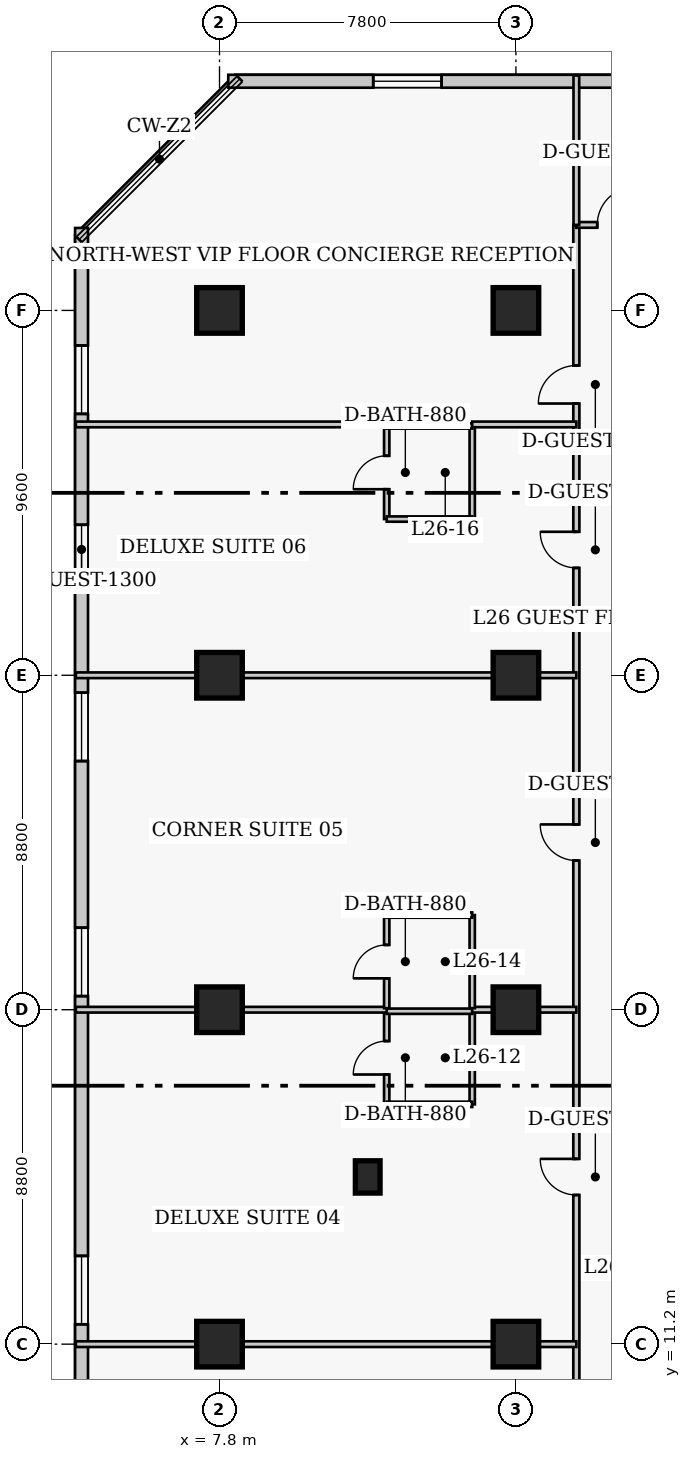
"""IFC4 building model, lengths in metres.
Left out: names, types, materials, properties, quantities, classifications, styles, units other than length and angle.
Written with IfcOpenShell. Run it as: python <this file> out.ifc"""

import sys

from ifc_helpers import new_model, si_unit, direction, frame, frame_2d, origin, origin_2d, place, context, subcontext, project, spatial, rectangle, extrude, element, fill, save


model = new_model("IFC4")
c1 = context("Model", 3, precision=1e-05, world=origin(), true_north=direction((0.0, 1.0)))
c2 = subcontext(c1, "Body", "Model", "MODEL_VIEW")
j1 = project(units=[si_unit("LENGTHUNIT", "METRE"), si_unit("PLANEANGLEUNIT", "RADIAN")], contexts=[c1])
p1 = place(None, origin())
s1 = spatial("IfcSite", under=j1, at=p1, CompositionType="ELEMENT")
p2 = place(p1, origin())
s2 = spatial("IfcBuilding", under=s1, at=p2, CompositionType="ELEMENT")
p3 = place(p2, frame((0.0, 0.0, 107.0)))
s3 = spatial("IfcBuildingStorey", under=s2, at=p3, CompositionType="ELEMENT", Elevation=107.0)
for number, where, z_axis, x_axis in (
    (1, (7.8, 11.2, 0.0), (0.0, 0.0, 1.0), (1.0, 0.0, 0.0)),
    (2, (7.8, 20.0, 0.0), (0.0, 0.0, 1.0), (1.0, 0.0, 0.0)),
    (3, (7.8, 28.8, 0.0), (0.0, 0.0, 1.0), (1.0, 0.0, 0.0)),
    (4, (7.8, 38.4, 0.0), (0.0, 0.0, 1.0), (1.0, 0.0, 0.0)),
    (5, (15.6, 11.2, 0.0), (0.0, 0.0, 1.0), (1.0, 0.0, 0.0)),
    (6, (15.6, 20.0, 0.0), (0.0, 0.0, 1.0), (1.0, 0.0, 0.0)),
    (7, (15.6, 28.8, 0.0), (0.0, 0.0, 1.0), (1.0, 0.0, 0.0)),
    (8, (15.6, 38.4, 0.0), (0.0, 0.0, 1.0), (1.0, 0.0, 0.0)),
):
    element("IfcColumn", number, at=place(p3, frame(where, z_axis=z_axis, x_axis=x_axis)), inside=s3, PredefinedType="COLUMN", context=c2, shape_type="SweptSolid", body=[
        extrude(rectangle(XDim=1.2, YDim=1.2, at=origin_2d()), origin(), (0.0, 0.0, 1.0), 3.8),
    ])
p4 = place(p3, frame((11.7, 15.6, 0.0), z_axis=(0.0, 0.0, 1.0), x_axis=(1.0, 0.0, 0.0)))
e9 = element("IfcColumn", 9, at=p4, inside=s3, PredefinedType="PILASTER", context=c2, shape_type="SweptSolid", body=[
    extrude(rectangle(XDim=0.65, YDim=0.85, at=origin_2d()), origin(), (0.0, 0.0, 1.0), 3.8),
])
p5 = place(p3, frame((36.32, 44.43, 0.0), z_axis=(0.0, 0.0, 1.0), x_axis=(-1.0, 0.0, 0.0)))
e10 = element("IfcWall", 10, at=p5, inside=s3, PredefinedType="SOLIDWALL", context=c2, shape_type="SweptSolid", body=[
    extrude(rectangle(XDim=28.29, YDim=0.34, at=frame_2d((14.145, 0.0))), origin(), (0.0, 0.0, 1.0), 3.54),
])
p6 = place(p5, frame((3.815, 0.0, 0.85)))
e11 = element("IfcOpeningElement", 11, at=p6, cuts=e10, PredefinedType="OPENING", context=c2, shape_type="SweptSolid", body=[
    extrude(rectangle(XDim=1.8, YDim=1.8, at=frame_2d((0.9, 0.9))), frame((0.0, 0.18, 0.0), z_axis=(0.0, -1.0, 0.0), x_axis=(1.0, 0.0, 0.0)), (0.0, 0.0, 1.0), 0.36),
])
p7 = place(p5, frame((13.245, 0.0, 0.85)))
e12 = element("IfcOpeningElement", 12, at=p7, cuts=e10, PredefinedType="OPENING", context=c2, shape_type="SweptSolid", body=[
    extrude(rectangle(XDim=1.8, YDim=1.8, at=frame_2d((0.9, 0.9))), frame((0.0, 0.18, 0.0), z_axis=(0.0, -1.0, 0.0), x_axis=(1.0, 0.0, 0.0)), (0.0, 0.0, 1.0), 0.36),
])
p8 = place(p5, frame((22.675, 0.0, 0.85)))
e13 = element("IfcOpeningElement", 13, at=p8, cuts=e10, PredefinedType="OPENING", context=c2, shape_type="SweptSolid", body=[
    extrude(rectangle(XDim=1.8, YDim=1.8, at=frame_2d((0.9, 0.9))), frame((0.0, 0.18, 0.0), z_axis=(0.0, -1.0, 0.0), x_axis=(1.0, 0.0, 0.0)), (0.0, 0.0, 1.0), 0.36),
])
p9 = place(p3, frame((4.17, 40.57, 0.0), z_axis=(0.0, 0.0, 1.0), x_axis=(0.0, -1.0, 0.0)))
e14 = element("IfcWall", 14, at=p9, inside=s3, PredefinedType="SOLIDWALL", context=c2, shape_type="SweptSolid", body=[
    extrude(rectangle(XDim=31.94, YDim=0.34, at=frame_2d((15.97, 0.0))), origin(), (0.0, 0.0, 1.0), 3.54),
])
p10 = place(p9, frame((3.093, 0.0, 0.85)))
e15 = element("IfcOpeningElement", 15, at=p10, cuts=e14, PredefinedType="OPENING", context=c2, shape_type="SweptSolid", body=[
    extrude(rectangle(XDim=1.8, YDim=1.8, at=frame_2d((0.9, 0.9))), frame((0.0, 0.18, 0.0), z_axis=(0.0, -1.0, 0.0), x_axis=(1.0, 0.0, 0.0)), (0.0, 0.0, 1.0), 0.36),
])
p11 = place(p9, frame((12.228, 0.0, 0.85)))
e16 = element("IfcOpeningElement", 16, at=p11, cuts=e14, PredefinedType="OPENING", context=c2, shape_type="SweptSolid", body=[
    extrude(rectangle(XDim=1.8, YDim=1.8, at=frame_2d((0.9, 0.9))), frame((0.0, 0.18, 0.0), z_axis=(0.0, -1.0, 0.0), x_axis=(1.0, 0.0, 0.0)), (0.0, 0.0, 1.0), 0.36),
])
p12 = place(p9, frame((18.413, 0.0, 0.85)))
e17 = element("IfcOpeningElement", 17, at=p12, cuts=e14, PredefinedType="OPENING", context=c2, shape_type="SweptSolid", body=[
    extrude(rectangle(XDim=1.8, YDim=1.8, at=frame_2d((0.9, 0.9))), frame((0.0, 0.18, 0.0), z_axis=(0.0, -1.0, 0.0), x_axis=(1.0, 0.0, 0.0)), (0.0, 0.0, 1.0), 0.36),
])
p13 = place(p9, frame((27.048, 0.0, 0.85)))
e18 = element("IfcOpeningElement", 18, at=p13, cuts=e14, PredefinedType="OPENING", context=c2, shape_type="SweptSolid", body=[
    extrude(rectangle(XDim=1.8, YDim=1.8, at=frame_2d((0.9, 0.9))), frame((0.0, 0.18, 0.0), z_axis=(0.0, -1.0, 0.0), x_axis=(1.0, 0.0, 0.0)), (0.0, 0.0, 1.0), 0.36),
])
p14 = place(p9, frame((7.81, 0.0, 0.85)))
e19 = element("IfcOpeningElement", 19, at=p14, cuts=e14, PredefinedType="OPENING", context=c2, shape_type="SweptSolid", body=[
    extrude(rectangle(XDim=1.3, YDim=1.7, at=frame_2d((0.65, 0.85))), frame((0.0, 0.18, 0.0), z_axis=(0.0, -1.0, 0.0), x_axis=(1.0, 0.0, 0.0)), (0.0, 0.0, 1.0), 0.36),
])
p15 = place(p3, frame((17.19, 6.65, 0.0), z_axis=(0.0, 0.0, 1.0), x_axis=(0.0, 1.0, 0.0)))
e20 = element("IfcWall", 20, at=p15, inside=s3, PredefinedType="PARTITIONING", context=c2, shape_type="SweptSolid", body=[
    extrude(rectangle(XDim=34.0, YDim=0.16, at=frame_2d((17.0, 0.0))), origin(), (0.0, 0.0, 1.0), 3.54),
])
p16 = place(p15, frame((1.8, 0.0, 0.0)))
e21 = element("IfcOpeningElement", 21, at=p16, cuts=e20, PredefinedType="OPENING", context=c2, shape_type="SweptSolid", body=[
    extrude(rectangle(XDim=0.95, YDim=2.1, at=frame_2d((0.475, 1.05))), frame((0.0, 0.09, 0.0), z_axis=(0.0, -1.0, 0.0), x_axis=(1.0, 0.0, 0.0)), (0.0, 0.0, 1.0), 0.18),
])
p17 = place(p15, frame((8.475, 0.0, 0.0)))
e22 = element("IfcOpeningElement", 22, at=p17, cuts=e20, PredefinedType="OPENING", context=c2, shape_type="SweptSolid", body=[
    extrude(rectangle(XDim=0.95, YDim=2.1, at=frame_2d((0.475, 1.05))), frame((0.0, 0.09, 0.0), z_axis=(0.0, -1.0, 0.0), x_axis=(1.0, 0.0, 0.0)), (0.0, 0.0, 1.0), 0.18),
])
p18 = place(p15, frame((17.275, 0.0, 0.0)))
e23 = element("IfcOpeningElement", 23, at=p18, cuts=e20, PredefinedType="OPENING", context=c2, shape_type="SweptSolid", body=[
    extrude(rectangle(XDim=0.95, YDim=2.1, at=frame_2d((0.475, 1.05))), frame((0.0, 0.09, 0.0), z_axis=(0.0, -1.0, 0.0), x_axis=(1.0, 0.0, 0.0)), (0.0, 0.0, 1.0), 0.18),
])
p19 = place(p15, frame((24.975, 0.0, 0.0)))
e24 = element("IfcOpeningElement", 24, at=p19, cuts=e20, PredefinedType="OPENING", context=c2, shape_type="SweptSolid", body=[
    extrude(rectangle(XDim=0.95, YDim=2.1, at=frame_2d((0.475, 1.05))), frame((0.0, 0.09, 0.0), z_axis=(0.0, -1.0, 0.0), x_axis=(1.0, 0.0, 0.0)), (0.0, 0.0, 1.0), 0.18),
])
p20 = place(p15, frame((29.3, 0.0, 0.0)))
e25 = element("IfcOpeningElement", 25, at=p20, cuts=e20, PredefinedType="OPENING", context=c2, shape_type="SweptSolid", body=[
    extrude(rectangle(XDim=1.0, YDim=2.15, at=frame_2d((0.5, 1.075))), frame((0.0, 0.09, 0.0), z_axis=(0.0, -1.0, 0.0), x_axis=(1.0, 0.0, 0.0)), (0.0, 0.0, 1.0), 0.18),
])
p21 = place(p3, frame((17.19, 40.65, 0.0), z_axis=(0.0, 0.0, 1.0), x_axis=(1.0, 0.0, 0.0)))
e26 = element("IfcWall", 26, at=p21, inside=s3, PredefinedType="PARTITIONING", context=c2, shape_type="SweptSolid", body=[
    extrude(rectangle(XDim=4.91, YDim=0.15, at=frame_2d((2.455, 0.0))), origin(), (0.0, 0.0, 1.0), 3.54),
])
p22 = place(p21, frame((0.55, 0.0, 0.0)))
e27 = element("IfcOpeningElement", 27, at=p22, cuts=e26, PredefinedType="OPENING", context=c2, shape_type="SweptSolid", body=[
    extrude(rectangle(XDim=1.0, YDim=2.15, at=frame_2d((0.5, 1.075))), frame((0.0, 0.085, 0.0), z_axis=(0.0, -1.0, 0.0), x_axis=(1.0, 0.0, 0.0)), (0.0, 0.0, 1.0), 0.17),
])
p23 = place(p3, frame((17.19, 40.65, 0.0), z_axis=(0.0, 0.0, 1.0), x_axis=(0.0, 1.0, 0.0)))
e28 = element("IfcWall", 28, at=p23, inside=s3, PredefinedType="PARTITIONING", context=c2, shape_type="SweptSolid", body=[
    extrude(rectangle(XDim=3.93, YDim=0.15, at=frame_2d((1.965, 0.0))), origin(), (0.0, 0.0, 1.0), 3.54),
])
p24 = place(p3, frame((4.02, 11.2, 0.0), z_axis=(0.0, 0.0, 1.0), x_axis=(1.0, 0.0, 0.0)))
e29 = element("IfcWall", 29, at=p24, inside=s3, PredefinedType="PARTITIONING", context=c2, shape_type="SweptSolid", body=[
    extrude(rectangle(XDim=13.17, YDim=0.15, at=frame_2d((6.585, 0.0))), origin(), (0.0, 0.0, 1.0), 2.679),
])
p25 = place(p3, frame((12.2, 17.51, 0.0), z_axis=(0.0, 0.0, 1.0), x_axis=(0.0, 1.0, 0.0)))
e30 = element("IfcWall", 30, at=p25, inside=s3, PredefinedType="PLUMBINGWALL", context=c2, shape_type="SweptSolid", body=[
    extrude(rectangle(XDim=2.45, YDim=0.14, at=frame_2d((1.225, 0.0))), origin(), (0.0, 0.0, 1.0), 3.54),
])
p26 = place(p25, frame((0.785, 0.0, 0.0)))
e31 = element("IfcOpeningElement", 31, at=p26, cuts=e30, PredefinedType="OPENING", context=c2, shape_type="SweptSolid", body=[
    extrude(rectangle(XDim=0.88, YDim=2.05, at=frame_2d((0.44, 1.025))), frame((0.0, 0.08, 0.0), z_axis=(0.0, -1.0, 0.0), x_axis=(1.0, 0.0, 0.0)), (0.0, 0.0, 1.0), 0.16),
])
p27 = place(p3, frame((14.45, 17.51, 0.0), z_axis=(0.0, 0.0, 1.0), x_axis=(0.0, 1.0, 0.0)))
e32 = element("IfcWall", 32, at=p27, inside=s3, PredefinedType="PLUMBINGWALL", context=c2, shape_type="SweptSolid", body=[
    extrude(rectangle(XDim=2.45, YDim=0.14, at=frame_2d((1.225, 0.0))), origin(), (0.0, 0.0, 1.0), 3.54),
])
p28 = place(p3, frame((12.2, 17.51, 0.0), z_axis=(0.0, 0.0, 1.0), x_axis=(1.0, 0.0, 0.0)))
e33 = element("IfcWall", 33, at=p28, inside=s3, PredefinedType="PLUMBINGWALL", context=c2, shape_type="SweptSolid", body=[
    extrude(rectangle(XDim=2.25, YDim=0.14, at=frame_2d((1.125, 0.0))), origin(), (0.0, 0.0, 1.0), 3.54),
])
p29 = place(p3, frame((12.2, 19.96, 0.0), z_axis=(0.0, 0.0, 1.0), x_axis=(1.0, 0.0, 0.0)))
e34 = element("IfcWall", 34, at=p29, inside=s3, PredefinedType="PLUMBINGWALL", context=c2, shape_type="SweptSolid", body=[
    extrude(rectangle(XDim=2.25, YDim=0.14, at=frame_2d((1.125, 0.0))), origin(), (0.0, 0.0, 1.0), 2.679),
])
p30 = place(p3, frame((4.02, 20.0, 0.0), z_axis=(0.0, 0.0, 1.0), x_axis=(1.0, 0.0, 0.0)))
e35 = element("IfcWall", 35, at=p30, inside=s3, PredefinedType="PARTITIONING", context=c2, shape_type="SweptSolid", body=[
    extrude(rectangle(XDim=8.18, YDim=0.15, at=frame_2d((4.09, 0.0))), origin(), (0.0, 0.0, 1.0), 2.679),
])
p31 = place(p3, frame((14.45, 20.0, 0.0), z_axis=(0.0, 0.0, 1.0), x_axis=(1.0, 0.0, 0.0)))
e36 = element("IfcWall", 36, at=p31, inside=s3, PredefinedType="PARTITIONING", context=c2, shape_type="SweptSolid", body=[
    extrude(rectangle(XDim=2.74, YDim=0.15, at=frame_2d((1.37, 0.0))), origin(), (0.0, 0.0, 1.0), 2.679),
])
p32 = place(p3, frame((12.2, 20.04, 0.0), z_axis=(0.0, 0.0, 1.0), x_axis=(0.0, 1.0, 0.0)))
e37 = element("IfcWall", 37, at=p32, inside=s3, PredefinedType="PLUMBINGWALL", context=c2, shape_type="SweptSolid", body=[
    extrude(rectangle(XDim=2.45, YDim=0.14, at=frame_2d((1.225, 0.0))), origin(), (0.0, 0.0, 1.0), 3.54),
])
p33 = place(p32, frame((0.785, 0.0, 0.0)))
e38 = element("IfcOpeningElement", 38, at=p33, cuts=e37, PredefinedType="OPENING", context=c2, shape_type="SweptSolid", body=[
    extrude(rectangle(XDim=0.88, YDim=2.05, at=frame_2d((0.44, 1.025))), frame((0.0, 0.08, 0.0), z_axis=(0.0, -1.0, 0.0), x_axis=(1.0, 0.0, 0.0)), (0.0, 0.0, 1.0), 0.16),
])
p34 = place(p3, frame((14.45, 20.04, 0.0), z_axis=(0.0, 0.0, 1.0), x_axis=(0.0, 1.0, 0.0)))
e39 = element("IfcWall", 39, at=p34, inside=s3, PredefinedType="PLUMBINGWALL", context=c2, shape_type="SweptSolid", body=[
    extrude(rectangle(XDim=2.45, YDim=0.14, at=frame_2d((1.225, 0.0))), origin(), (0.0, 0.0, 1.0), 3.54),
])
p35 = place(p3, frame((12.2, 22.49, 0.0), z_axis=(0.0, 0.0, 1.0), x_axis=(1.0, 0.0, 0.0)))
e40 = element("IfcWall", 40, at=p35, inside=s3, PredefinedType="PLUMBINGWALL", context=c2, shape_type="SweptSolid", body=[
    extrude(rectangle(XDim=2.25, YDim=0.14, at=frame_2d((1.125, 0.0))), origin(), (0.0, 0.0, 1.0), 3.54),
])
p36 = place(p3, frame((4.02, 28.8, 0.0), z_axis=(0.0, 0.0, 1.0), x_axis=(1.0, 0.0, 0.0)))
e41 = element("IfcWall", 41, at=p36, inside=s3, PredefinedType="PARTITIONING", context=c2, shape_type="SweptSolid", body=[
    extrude(rectangle(XDim=13.17, YDim=0.15, at=frame_2d((6.585, 0.0))), origin(), (0.0, 0.0, 1.0), 2.679),
])
p37 = place(p3, frame((12.2, 32.91, 0.0), z_axis=(0.0, 0.0, 1.0), x_axis=(0.0, 1.0, 0.0)))
e42 = element("IfcWall", 42, at=p37, inside=s3, PredefinedType="PLUMBINGWALL", context=c2, shape_type="SweptSolid", body=[
    extrude(rectangle(XDim=2.45, YDim=0.14, at=frame_2d((1.225, 0.0))), origin(), (0.0, 0.0, 1.0), 3.54),
])
p38 = place(p37, frame((0.785, 0.0, 0.0)))
e43 = element("IfcOpeningElement", 43, at=p38, cuts=e42, PredefinedType="OPENING", context=c2, shape_type="SweptSolid", body=[
    extrude(rectangle(XDim=0.88, YDim=2.05, at=frame_2d((0.44, 1.025))), frame((0.0, 0.08, 0.0), z_axis=(0.0, -1.0, 0.0), x_axis=(1.0, 0.0, 0.0)), (0.0, 0.0, 1.0), 0.16),
])
p39 = place(p3, frame((14.45, 32.91, 0.0), z_axis=(0.0, 0.0, 1.0), x_axis=(0.0, 1.0, 0.0)))
e44 = element("IfcWall", 44, at=p39, inside=s3, PredefinedType="PLUMBINGWALL", context=c2, shape_type="SweptSolid", body=[
    extrude(rectangle(XDim=2.45, YDim=0.14, at=frame_2d((1.225, 0.0))), origin(), (0.0, 0.0, 1.0), 3.54),
])
for number, where, z_axis, x_axis in (
    (45, (12.2, 32.91, 0.0), (0.0, 0.0, 1.0), (1.0, 0.0, 0.0)),
    (46, (12.2, 35.36, 0.0), (0.0, 0.0, 1.0), (1.0, 0.0, 0.0)),
):
    element("IfcWall", number, at=place(p3, frame(where, z_axis=z_axis, x_axis=x_axis)), inside=s3, PredefinedType="PLUMBINGWALL", context=c2, shape_type="SweptSolid", body=[
        extrude(rectangle(XDim=2.25, YDim=0.14, at=frame_2d((1.125, 0.0))), origin(), (0.0, 0.0, 1.0), 3.54),
    ])
p40 = place(p3, frame((4.02, 35.4, 0.0), z_axis=(0.0, 0.0, 1.0), x_axis=(1.0, 0.0, 0.0)))
e47 = element("IfcWall", 47, at=p40, inside=s3, PredefinedType="PARTITIONING", context=c2, shape_type="SweptSolid", body=[
    extrude(rectangle(XDim=8.18, YDim=0.15, at=frame_2d((4.09, 0.0))), origin(), (0.0, 0.0, 1.0), 3.54),
])
p41 = place(p3, frame((14.45, 35.4, 0.0), z_axis=(0.0, 0.0, 1.0), x_axis=(1.0, 0.0, 0.0)))
e48 = element("IfcWall", 48, at=p41, inside=s3, PredefinedType="PARTITIONING", context=c2, shape_type="SweptSolid", body=[
    extrude(rectangle(XDim=2.74, YDim=0.15, at=frame_2d((1.37, 0.0))), origin(), (0.0, 0.0, 1.0), 3.54),
])
p42 = place(p8, origin())
e49 = element("IfcWindow", 49, at=p42, inside=s3, PartitioningType="SINGLE_PANEL", PredefinedType="WINDOW", context=c2, shape_type="SweptSolid", body=[
    extrude(rectangle(XDim=1.8, YDim=1.8, at=frame_2d((0.9, 0.9))), frame((0.0, 0.03, 0.0), z_axis=(0.0, -1.0, 0.0), x_axis=(1.0, 0.0, 0.0)), (0.0, 0.0, 1.0), 0.06),
])
fill(e13, e49)
p43 = place(p10, origin())
e50 = element("IfcWindow", 50, at=p43, inside=s3, PartitioningType="SINGLE_PANEL", PredefinedType="WINDOW", context=c2, shape_type="SweptSolid", body=[
    extrude(rectangle(XDim=1.8, YDim=1.8, at=frame_2d((0.9, 0.9))), frame((0.0, 0.03, 0.0), z_axis=(0.0, -1.0, 0.0), x_axis=(1.0, 0.0, 0.0)), (0.0, 0.0, 1.0), 0.06),
])
fill(e15, e50)
p44 = place(p11, origin())
e51 = element("IfcWindow", 51, at=p44, inside=s3, PartitioningType="SINGLE_PANEL", PredefinedType="WINDOW", context=c2, shape_type="SweptSolid", body=[
    extrude(rectangle(XDim=1.8, YDim=1.8, at=frame_2d((0.9, 0.9))), frame((0.0, 0.03, 0.0), z_axis=(0.0, -1.0, 0.0), x_axis=(1.0, 0.0, 0.0)), (0.0, 0.0, 1.0), 0.06),
])
fill(e16, e51)
p45 = place(p12, origin())
e52 = element("IfcWindow", 52, at=p45, inside=s3, PartitioningType="SINGLE_PANEL", PredefinedType="WINDOW", context=c2, shape_type="SweptSolid", body=[
    extrude(rectangle(XDim=1.8, YDim=1.8, at=frame_2d((0.9, 0.9))), frame((0.0, 0.03, 0.0), z_axis=(0.0, -1.0, 0.0), x_axis=(1.0, 0.0, 0.0)), (0.0, 0.0, 1.0), 0.06),
])
fill(e17, e52)
p46 = place(p13, origin())
e53 = element("IfcWindow", 53, at=p46, inside=s3, PartitioningType="SINGLE_PANEL", PredefinedType="WINDOW", context=c2, shape_type="SweptSolid", body=[
    extrude(rectangle(XDim=1.8, YDim=1.8, at=frame_2d((0.9, 0.9))), frame((0.0, 0.03, 0.0), z_axis=(0.0, -1.0, 0.0), x_axis=(1.0, 0.0, 0.0)), (0.0, 0.0, 1.0), 0.06),
])
fill(e18, e53)
p47 = place(p14, origin())
e54 = element("IfcWindow", 54, at=p47, inside=s3, PartitioningType="SINGLE_PANEL", PredefinedType="WINDOW", context=c2, shape_type="SweptSolid", body=[
    extrude(rectangle(XDim=1.3, YDim=1.7, at=frame_2d((0.65, 0.85))), frame((0.0, 0.03, 0.0), z_axis=(0.0, -1.0, 0.0), x_axis=(1.0, 0.0, 0.0)), (0.0, 0.0, 1.0), 0.06),
])
fill(e19, e54)
p48 = place(p22, origin())
e55 = element("IfcDoor", 55, at=p48, inside=s3, OperationType="SINGLE_SWING_RIGHT", PredefinedType="DOOR", context=c2, shape_type="SweptSolid", body=[
    extrude(rectangle(XDim=1.0, YDim=2.15, at=frame_2d((0.5, 1.075))), frame((0.0, 0.025, 0.0), z_axis=(0.0, -1.0, 0.0), x_axis=(1.0, 0.0, 0.0)), (0.0, 0.0, 1.0), 0.05),
])
fill(e27, e55)
p49 = place(p26, origin())
e56 = element("IfcDoor", 56, at=p49, inside=s3, OperationType="SINGLE_SWING_LEFT", PredefinedType="DOOR", context=c2, shape_type="SweptSolid", body=[
    extrude(rectangle(XDim=0.88, YDim=2.05, at=frame_2d((0.44, 1.025))), frame((0.0, 0.025, 0.0), z_axis=(0.0, -1.0, 0.0), x_axis=(1.0, 0.0, 0.0)), (0.0, 0.0, 1.0), 0.05),
])
fill(e31, e56)
p50 = place(p17, origin())
e57 = element("IfcDoor", 57, at=p50, inside=s3, OperationType="SINGLE_SWING_RIGHT", PredefinedType="DOOR", context=c2, shape_type="SweptSolid", body=[
    extrude(rectangle(XDim=0.95, YDim=2.1, at=frame_2d((0.475, 1.05))), frame((0.0, 0.025, 0.0), z_axis=(0.0, -1.0, 0.0), x_axis=(1.0, 0.0, 0.0)), (0.0, 0.0, 1.0), 0.05),
])
fill(e22, e57)
p51 = place(p33, origin())
e58 = element("IfcDoor", 58, at=p51, inside=s3, OperationType="SINGLE_SWING_LEFT", PredefinedType="DOOR", context=c2, shape_type="SweptSolid", body=[
    extrude(rectangle(XDim=0.88, YDim=2.05, at=frame_2d((0.44, 1.025))), frame((0.0, 0.025, 0.0), z_axis=(0.0, -1.0, 0.0), x_axis=(1.0, 0.0, 0.0)), (0.0, 0.0, 1.0), 0.05),
])
fill(e38, e58)
p52 = place(p18, origin())
e59 = element("IfcDoor", 59, at=p52, inside=s3, OperationType="SINGLE_SWING_RIGHT", PredefinedType="DOOR", context=c2, shape_type="SweptSolid", body=[
    extrude(rectangle(XDim=0.95, YDim=2.1, at=frame_2d((0.475, 1.05))), frame((0.0, 0.025, 0.0), z_axis=(0.0, -1.0, 0.0), x_axis=(1.0, 0.0, 0.0)), (0.0, 0.0, 1.0), 0.05),
])
fill(e23, e59)
p53 = place(p38, origin())
e60 = element("IfcDoor", 60, at=p53, inside=s3, OperationType="SINGLE_SWING_LEFT", PredefinedType="DOOR", context=c2, shape_type="SweptSolid", body=[
    extrude(rectangle(XDim=0.88, YDim=2.05, at=frame_2d((0.44, 1.025))), frame((0.0, 0.025, 0.0), z_axis=(0.0, -1.0, 0.0), x_axis=(1.0, 0.0, 0.0)), (0.0, 0.0, 1.0), 0.05),
])
fill(e43, e60)
p54 = place(p19, origin())
e61 = element("IfcDoor", 61, at=p54, inside=s3, OperationType="SINGLE_SWING_RIGHT", PredefinedType="DOOR", context=c2, shape_type="SweptSolid", body=[
    extrude(rectangle(XDim=0.95, YDim=2.1, at=frame_2d((0.475, 1.05))), frame((0.0, 0.025, 0.0), z_axis=(0.0, -1.0, 0.0), x_axis=(1.0, 0.0, 0.0)), (0.0, 0.0, 1.0), 0.05),
])
fill(e24, e61)
p55 = place(p20, origin())
e62 = element("IfcDoor", 62, at=p55, inside=s3, OperationType="SINGLE_SWING_LEFT", PredefinedType="DOOR", context=c2, shape_type="SweptSolid", body=[
    extrude(rectangle(XDim=1.0, YDim=2.15, at=frame_2d((0.5, 1.075))), frame((0.0, 0.025, 0.0), z_axis=(0.0, -1.0, 0.0), x_axis=(1.0, 0.0, 0.0)), (0.0, 0.0, 1.0), 0.05),
])
fill(e25, e62)
save(model, sys.argv[1])
